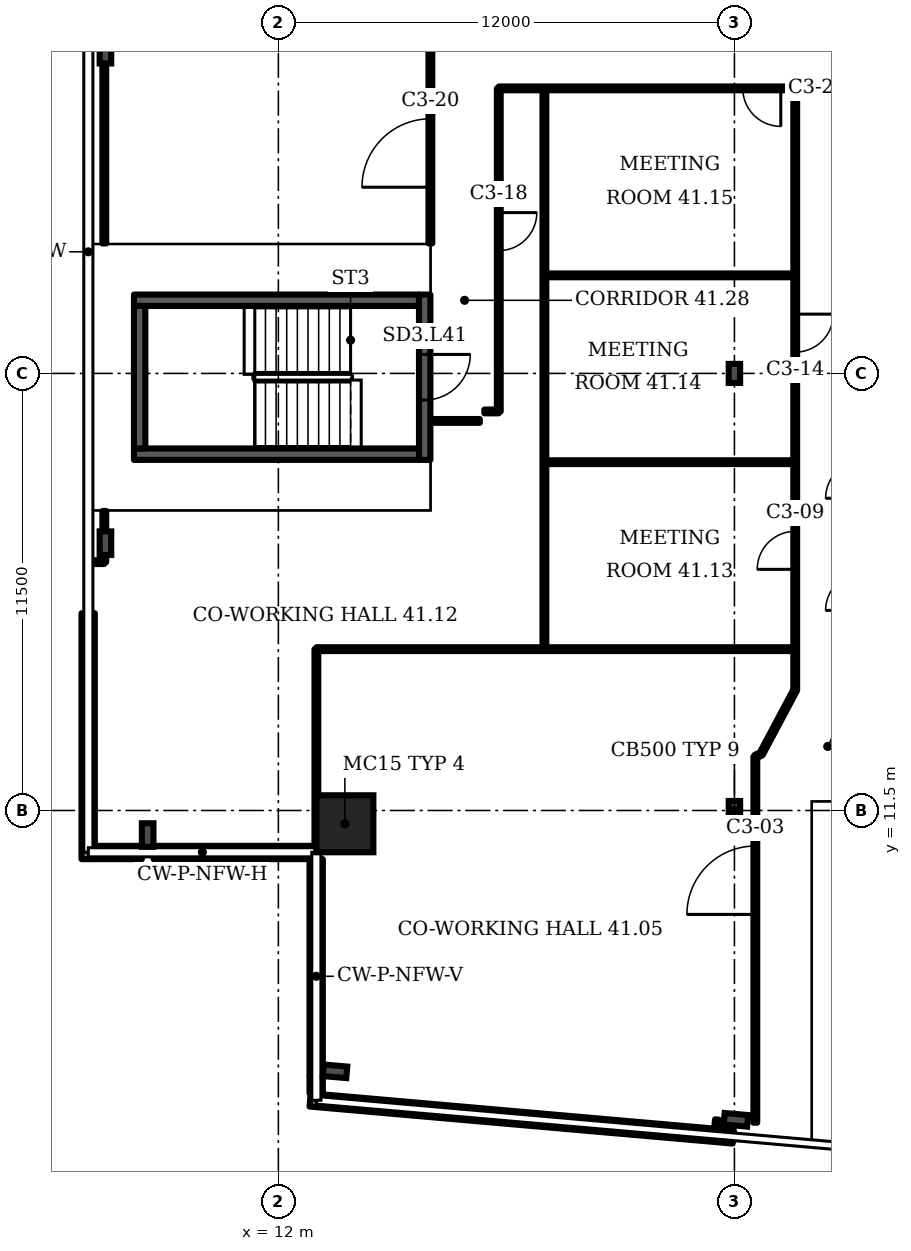
"""IFC4 building model, lengths in metres.
Left out: names, types, materials, properties, quantities, classifications, styles, units other than length and angle.
Written with IfcOpenShell. Run it as: python <this file> out.ifc"""

import sys

from ifc_helpers import new_model, si_unit, direction, frame, frame_2d, origin, origin_2d, place, context, subcontext, project, spatial, rectangle, i_section, extrude, element, fill, save


model = new_model("IFC4")
c1 = context("Model", 3, precision=1e-05, world=origin(), true_north=direction((0.0, 1.0)))
c2 = subcontext(c1, "Body", "Model", "MODEL_VIEW")
j1 = project(units=[si_unit("LENGTHUNIT", "METRE"), si_unit("PLANEANGLEUNIT", "RADIAN")], contexts=[c1])
p1 = place(None, origin())
s1 = spatial("IfcSite", under=j1, at=p1, CompositionType="ELEMENT")
p2 = place(p1, origin())
s2 = spatial("IfcBuilding", under=s1, at=p2, CompositionType="ELEMENT")
p3 = place(p2, frame((0.0, 0.0, 169.9)))
s3 = spatial("IfcBuildingStorey", under=s2, at=p3, CompositionType="ELEMENT", Elevation=169.9)
p4 = place(p3, frame((13.75, 11.15, 0.0), z_axis=(0.0, 0.0, 1.0), x_axis=(1.0, 0.0, 0.0)))
e1 = element("IfcColumn", 1, at=p4, inside=s3, PredefinedType="COLUMN", context=c2, shape_type="SweptSolid", body=[
    extrude(rectangle(XDim=1.5, YDim=1.5, at=origin_2d()), origin(), (0.0, 0.0, 1.0), 3.6),
])
for number, where, z_axis, x_axis in (
    (2, (13.491, 4.637, 0.0), (0.0, 0.0, 1.0), (-0.087, -0.996, 0.0)),
    (3, (24.039, 3.361, 0.0), (0.0, 0.0, 1.0), (-0.087, -0.996, 0.0)),
    (4, (7.45, 31.467, 0.0), (0.0, 0.0, 1.0), (-1.0, 0.0, 0.0)),
    (5, (7.45, 18.533, 0.0), (0.0, 0.0, 1.0), (-1.0, 0.0, 0.0)),
    (6, (8.561, 10.854, 0.0), (0.0, 0.0, 1.0), (-1.0, 0.0, 0.0)),
):
    element("IfcColumn", number, at=place(p3, frame(where, z_axis=z_axis, x_axis=x_axis)), inside=s3, PredefinedType="COLUMN", context=c2, shape_type="SweptSolid", body=[
        extrude(i_section(OverallWidth=0.305, OverallDepth=0.62, WebThickness=0.021, FlangeThickness=0.04, FilletRadius=0.027, at=origin_2d()), origin(), (0.0, 0.0, 1.0), 3.6),
    ])
for number, where, z_axis, x_axis in (
    (7, (24.0, 11.5, 0.0), (0.0, 0.0, 1.0), (1.0, 0.0, 0.0)),
    (8, (24.0, 23.0, 0.0), (0.0, 0.0, 1.0), (1.0, 0.0, 0.0)),
):
    element("IfcColumn", number, at=place(p3, frame(where, z_axis=z_axis, x_axis=x_axis)), inside=s3, PredefinedType="COLUMN", context=c2, shape_type="SweptSolid", body=[
        extrude(i_section(OverallWidth=0.3, OverallDepth=0.5, WebThickness=0.014, FlangeThickness=0.028, FilletRadius=0.027, at=origin_2d()), origin(), (0.0, 0.0, 1.0), 3.6),
    ])
p5 = place(p3, frame((12.835, 3.885, 0.0), z_axis=(0.0, 0.0, 1.0), x_axis=(0.996199, -0.087154, 0.0)))
e9 = element("IfcWall", 9, at=p5, inside=s3, PredefinedType="SOLIDWALL", context=c2, shape_type="SweptSolid", body=[
    extrude(rectangle(XDim=11.177, YDim=0.35, at=frame_2d((5.588, 0.0))), origin(), (0.0, 0.0, 1.0), 1.0),
])
p6 = place(p3, frame((6.995, 16.69, 0.0), z_axis=(0.0, 0.0, 1.0), x_axis=(0.0, -1.0, 0.0)))
e10 = element("IfcWall", 10, at=p6, inside=s3, PredefinedType="SOLIDWALL", context=c2, shape_type="SweptSolid", body=[
    extrude(rectangle(XDim=6.47, YDim=0.35, at=frame_2d((3.235, 0.0))), origin(), (0.0, 0.0, 1.0), 1.0),
])
p7 = place(p3, frame((7.17, 10.395, 0.0), z_axis=(0.0, 0.0, 1.0), x_axis=(1.0, 0.0, 0.0)))
e11 = element("IfcWall", 11, at=p7, inside=s3, PredefinedType="SOLIDWALL", context=c2, shape_type="SweptSolid", body=[
    extrude(rectangle(XDim=1.238, YDim=0.35, at=frame_2d((0.619, 0.0))), origin(), (0.0, 0.0, 1.0), 1.0),
])
p8 = place(p3, frame((8.713, 10.395, 0.0), z_axis=(0.0, 0.0, 1.0), x_axis=(1.0, 0.0, 0.0)))
e12 = element("IfcWall", 12, at=p8, inside=s3, PredefinedType="SOLIDWALL", context=c2, shape_type="SweptSolid", body=[
    extrude(rectangle(XDim=4.287, YDim=0.35, at=frame_2d((2.143, 0.0))), origin(), (0.0, 0.0, 1.0), 1.0),
])
p9 = place(p3, frame((12.995, 10.22, 0.0), z_axis=(0.0, 0.0, 1.0), x_axis=(0.0, -1.0, 0.0)))
e13 = element("IfcWall", 13, at=p9, inside=s3, PredefinedType="SOLIDWALL", context=c2, shape_type="SweptSolid", body=[
    extrude(rectangle(XDim=5.693, YDim=0.35, at=frame_2d((2.847, 0.0))), origin(), (0.0, 0.0, 1.0), 1.0),
])
p10 = place(p3, frame((12.995, 4.512, 0.0), z_axis=(0.0, 0.0, 1.0), x_axis=(0.0, -1.0, 0.0)))
e14 = element("IfcWall", 14, at=p10, inside=s3, PredefinedType="SOLIDWALL", context=c2, shape_type="SweptSolid", body=[
    extrude(rectangle(XDim=0.454, YDim=0.35, at=frame_2d((0.227, 0.0))), origin(), (0.0, 0.0, 1.0), 1.0),
])
p11 = place(p3, frame((15.85, 20.725, 0.0), z_axis=(0.0, 0.0, 1.0), x_axis=(0.0, 1.0, 0.0)))
e15 = element("IfcWall", 15, at=p11, inside=s3, PredefinedType="SHEAR", context=c2, shape_type="SweptSolid", body=[
    extrude(rectangle(XDim=4.35, YDim=0.3, at=frame_2d((2.175, 0.0))), origin(), (0.0, 0.0, 1.0), 3.2),
])
p12 = place(p11, frame((1.575, 0.0, 0.0)))
e16 = element("IfcOpeningElement", 16, at=p12, cuts=e15, PredefinedType="OPENING", context=c2, shape_type="SweptSolid", body=[
    extrude(rectangle(XDim=1.2, YDim=2.1, at=frame_2d((0.6, 1.05))), frame((0.0, 0.16, 0.0), z_axis=(0.0, -1.0, 0.0), x_axis=(1.0, 0.0, 0.0)), (0.0, 0.0, 1.0), 0.32),
])
p13 = place(p3, frame((7.02, 18.035, 0.0), z_axis=(0.0, 0.0, 1.0), x_axis=(1.0, 0.0, 0.0)))
e17 = element("IfcWall", 17, at=p13, inside=s3, PredefinedType="PARTITIONING", context=c2, shape_type="SweptSolid", body=[
    extrude(rectangle(XDim=0.4, YDim=0.1, at=frame_2d((0.2, 0.0))), origin(), (0.0, 0.0, 1.0), 3.2),
])
p14 = place(p3, frame((7.42, 18.035, 0.0), z_axis=(0.0, 0.0, 1.0), x_axis=(0.0, 1.0, 0.0)))
e18 = element("IfcWall", 18, at=p14, inside=s3, PredefinedType="PARTITIONING", context=c2, shape_type="SweptSolid", body=[
    extrude(rectangle(XDim=1.345, YDim=0.1, at=frame_2d((0.672, 0.0))), origin(), (0.0, 0.0, 1.0), 2.58),
])
p15 = place(p3, frame((7.42, 26.42, 0.0), z_axis=(0.0, 0.0, 1.0), x_axis=(0.0, 1.0, 0.0)))
e19 = element("IfcWall", 19, at=p15, inside=s3, PredefinedType="PARTITIONING", context=c2, shape_type="SweptSolid", body=[
    extrude(rectangle(XDim=15.56, YDim=0.1, at=frame_2d((7.78, 0.0))), origin(), (0.0, 0.0, 1.0), 2.58),
])
p16 = place(p3, frame((13.0, 10.42, 0.0), z_axis=(0.0, 0.0, 1.0), x_axis=(0.0, 1.0, 0.0)))
e20 = element("IfcWall", 20, at=p16, inside=s3, PredefinedType="PARTITIONING", context=c2, shape_type="SweptSolid", body=[
    extrude(rectangle(XDim=5.325, YDim=0.1, at=frame_2d((2.663, 0.0))), origin(), (0.0, 0.0, 1.0), 3.2),
])
p17 = place(p3, frame((13.0, 15.745, 0.0), z_axis=(0.0, 0.0, 1.0), x_axis=(1.0, 0.0, 0.0)))
e21 = element("IfcWall", 21, at=p17, inside=s3, PredefinedType="PARTITIONING", context=c2, shape_type="SweptSolid", body=[
    extrude(rectangle(XDim=12.6, YDim=0.1, at=frame_2d((6.3, 0.0))), origin(), (0.0, 0.0, 1.0), 3.2),
])
p18 = place(p3, frame((16.0, 26.42, 0.0), z_axis=(0.0, 0.0, 1.0), x_axis=(0.0, 1.0, 0.0)))
e22 = element("IfcWall", 22, at=p18, inside=s3, PredefinedType="PARTITIONING", context=c2, shape_type="SweptSolid", body=[
    extrude(rectangle(XDim=7.56, YDim=0.1, at=frame_2d((3.78, 0.0))), origin(), (0.0, 0.0, 1.0), 3.2),
])
p19 = place(p18, frame((1.48, 0.0, 0.0)))
e23 = element("IfcOpeningElement", 23, at=p19, cuts=e22, PredefinedType="OPENING", context=c2, shape_type="SweptSolid", body=[
    extrude(rectangle(XDim=1.8, YDim=2.1, at=frame_2d((0.9, 1.05))), frame((0.0, 0.06, 0.0), z_axis=(0.0, -1.0, 0.0), x_axis=(1.0, 0.0, 0.0)), (0.0, 0.0, 1.0), 0.12),
])
p20 = place(p3, frame((16.02, 21.75, 0.0), z_axis=(0.0, 0.0, 1.0), x_axis=(1.0, 0.0, 0.0)))
e24 = element("IfcWall", 24, at=p20, inside=s3, PredefinedType="PARTITIONING", context=c2, shape_type="SweptSolid", body=[
    extrude(rectangle(XDim=1.28, YDim=0.1, at=frame_2d((0.64, 0.0))), origin(), (0.0, 0.0, 1.0), 3.2),
])
p21 = place(p3, frame((17.42, 22.0, 0.0), z_axis=(0.0, 0.0, 1.0), x_axis=(1.0, 0.0, 0.0)))
e25 = element("IfcWall", 25, at=p21, inside=s3, PredefinedType="PARTITIONING", context=c2, shape_type="SweptSolid", body=[
    extrude(rectangle(XDim=0.38, YDim=0.1, at=frame_2d((0.19, 0.0))), origin(), (0.0, 0.0, 1.0), 3.2),
])
p22 = place(p3, frame((17.8, 22.0, 0.0), z_axis=(0.0, 0.0, 1.0), x_axis=(0.0, 1.0, 0.0)))
e26 = element("IfcWall", 26, at=p22, inside=s3, PredefinedType="PARTITIONING", context=c2, shape_type="SweptSolid", body=[
    extrude(rectangle(XDim=8.5, YDim=0.1, at=frame_2d((4.25, 0.0))), origin(), (0.0, 0.0, 1.0), 3.2),
])
p23 = place(p22, frame((4.231, 0.0, 0.0)))
e27 = element("IfcOpeningElement", 27, at=p23, cuts=e26, PredefinedType="OPENING", context=c2, shape_type="SweptSolid", body=[
    extrude(rectangle(XDim=1.0, YDim=2.1, at=frame_2d((0.5, 1.05))), frame((0.0, 0.06, 0.0), z_axis=(0.0, -1.0, 0.0), x_axis=(1.0, 0.0, 0.0)), (0.0, 0.0, 1.0), 0.12),
])
p24 = place(p3, frame((17.8, 30.5, 0.0), z_axis=(0.0, 0.0, 1.0), x_axis=(1.0, 0.0, 0.0)))
e28 = element("IfcWall", 28, at=p24, inside=s3, PredefinedType="PARTITIONING", context=c2, shape_type="SweptSolid", body=[
    extrude(rectangle(XDim=7.8, YDim=0.1, at=frame_2d((3.9, 0.0))), origin(), (0.0, 0.0, 1.0), 3.2),
])
p25 = place(p24, frame((6.42, 0.0, 0.0)))
e29 = element("IfcOpeningElement", 29, at=p25, cuts=e28, PredefinedType="OPENING", context=c2, shape_type="SweptSolid", body=[
    extrude(rectangle(XDim=1.0, YDim=2.1, at=frame_2d((0.5, 1.05))), frame((0.0, 0.06, 0.0), z_axis=(0.0, -1.0, 0.0), x_axis=(1.0, 0.0, 0.0)), (0.0, 0.0, 1.0), 0.12),
])
p26 = place(p3, frame((19.0, 15.745, 0.0), z_axis=(0.0, 0.0, 1.0), x_axis=(0.0, 1.0, 0.0)))
e30 = element("IfcWall", 30, at=p26, inside=s3, PredefinedType="PARTITIONING", context=c2, shape_type="SweptSolid", body=[
    extrude(rectangle(XDim=14.755, YDim=0.1, at=frame_2d((7.377, 0.0))), origin(), (0.0, 0.0, 1.0), 3.2),
])
for number, where, z_axis, x_axis in (
    (31, (19.0, 20.665, 0.0), (0.0, 0.0, 1.0), (1.0, 0.0, 0.0)),
    (32, (19.0, 25.58, 0.0), (0.0, 0.0, 1.0), (1.0, 0.0, 0.0)),
):
    element("IfcWall", number, at=place(p3, frame(where, z_axis=z_axis, x_axis=x_axis)), inside=s3, PredefinedType="PARTITIONING", context=c2, shape_type="SweptSolid", body=[
        extrude(rectangle(XDim=6.6, YDim=0.1, at=frame_2d((3.3, 0.0))), origin(), (0.0, 0.0, 1.0), 3.2),
    ])
p27 = place(p3, frame((23.502, 2.976, 0.0), z_axis=(0.0, 0.0, 1.0), x_axis=(0.095654, 0.995419, 0.0)))
e33 = element("IfcWall", 33, at=p27, inside=s3, PredefinedType="PARTITIONING", context=c2, shape_type="SweptSolid", body=[
    extrude(rectangle(XDim=0.396, YDim=0.1, at=frame_2d((0.198, 0.0))), origin(), (0.0, 0.0, 1.0), 3.2),
])
p28 = place(p3, frame((24.55, 12.915, 0.0), z_axis=(0.0, 0.0, 1.0), x_axis=(0.900306, 0.435266, 0.0)))
e34 = element("IfcWall", 34, at=p28, inside=s3, PredefinedType="PARTITIONING", context=c2, shape_type="SweptSolid", body=[
    extrude(rectangle(XDim=0.172, YDim=0.1, at=frame_2d((0.086, 0.0))), origin(), (0.0, 0.0, 1.0), 3.2),
])
p29 = place(p3, frame((24.55, 3.285, 0.0), z_axis=(0.0, 0.0, 1.0), x_axis=(0.0, 1.0, 0.0)))
e35 = element("IfcWall", 35, at=p29, inside=s3, PredefinedType="PARTITIONING", context=c2, shape_type="SweptSolid", body=[
    extrude(rectangle(XDim=9.63, YDim=0.1, at=frame_2d((4.815, 0.0))), origin(), (0.0, 0.0, 1.0), 3.2),
])
p30 = place(p29, frame((5.481, 0.0, 0.0)))
e36 = element("IfcOpeningElement", 36, at=p30, cuts=e35, PredefinedType="OPENING", context=c2, shape_type="SweptSolid", body=[
    extrude(rectangle(XDim=1.8, YDim=2.1, at=frame_2d((0.9, 1.05))), frame((0.0, 0.06, 0.0), z_axis=(0.0, -1.0, 0.0), x_axis=(1.0, 0.0, 0.0)), (0.0, 0.0, 1.0), 0.12),
])
p31 = place(p3, frame((24.705, 12.99, 0.0), z_axis=(0.0, 0.0, 1.0), x_axis=(0.4702, 0.882555, 0.0)))
e37 = element("IfcWall", 37, at=p31, inside=s3, PredefinedType="PARTITIONING", context=c2, shape_type="SweptSolid", body=[
    extrude(rectangle(XDim=1.904, YDim=0.1, at=frame_2d((0.952, 0.0))), origin(), (0.0, 0.0, 1.0), 3.2),
])
p32 = place(p3, frame((25.6, 14.67, 0.0), z_axis=(0.0, 0.0, 1.0), x_axis=(0.0, 1.0, 0.0)))
e38 = element("IfcWall", 38, at=p32, inside=s3, PredefinedType="PARTITIONING", context=c2, shape_type="SweptSolid", body=[
    extrude(rectangle(XDim=15.83, YDim=0.1, at=frame_2d((7.915, 0.0))), origin(), (0.0, 0.0, 1.0), 3.2),
])
p33 = place(p32, frame((3.175, 0.0, 0.0)))
e39 = element("IfcOpeningElement", 39, at=p33, cuts=e38, PredefinedType="OPENING", context=c2, shape_type="SweptSolid", body=[
    extrude(rectangle(XDim=1.0, YDim=2.1, at=frame_2d((0.5, 1.05))), frame((0.0, 0.06, 0.0), z_axis=(0.0, -1.0, 0.0), x_axis=(1.0, 0.0, 0.0)), (0.0, 0.0, 1.0), 0.12),
])
p34 = place(p32, frame((8.89, 0.0, 0.0)))
e40 = element("IfcOpeningElement", 40, at=p34, cuts=e38, PredefinedType="OPENING", context=c2, shape_type="SweptSolid", body=[
    extrude(rectangle(XDim=1.0, YDim=2.1, at=frame_2d((0.5, 1.05))), frame((0.0, 0.06, 0.0), z_axis=(0.0, -1.0, 0.0), x_axis=(1.0, 0.0, 0.0)), (0.0, 0.0, 1.0), 0.12),
])
for number, where, z_axis, x_axis in (
    (41, (8.2, 20.875, 0.0), (0.0, 0.0, 1.0), (1.0, 0.0, 0.0)),
    (42, (8.2, 24.925, 0.0), (0.0, 0.0, 1.0), (1.0, 0.0, 0.0)),
):
    element("IfcWall", number, at=place(p3, frame(where, z_axis=z_axis, x_axis=x_axis)), inside=s3, PredefinedType="SHEAR", context=c2, shape_type="SweptSolid", body=[
        extrude(rectangle(XDim=7.5, YDim=0.3, at=frame_2d((3.75, 0.0))), origin(), (0.0, 0.0, 1.0), 3.2),
    ])
p35 = place(p3, frame((8.35, 21.025, 0.0), z_axis=(0.0, 0.0, 1.0), x_axis=(0.0, 1.0, 0.0)))
e43 = element("IfcWall", 43, at=p35, inside=s3, PredefinedType="SHEAR", context=c2, shape_type="SweptSolid", body=[
    extrude(rectangle(XDim=3.75, YDim=0.3, at=frame_2d((1.875, 0.0))), origin(), (0.0, 0.0, 1.0), 3.2),
])
p36 = place(p12, origin())
e44 = element("IfcDoor", 44, at=p36, inside=s3, OperationType="SINGLE_SWING_RIGHT", PredefinedType="DOOR", context=c2, shape_type="SweptSolid", body=[
    extrude(rectangle(XDim=1.2, YDim=2.1, at=frame_2d((0.6, 1.05))), frame((0.0, 0.025, 0.0), z_axis=(0.0, -1.0, 0.0), x_axis=(1.0, 0.0, 0.0)), (0.0, 0.0, 1.0), 0.05),
])
fill(e16, e44)
p37 = place(p30, origin())
e45 = element("IfcDoor", 45, at=p37, inside=s3, OperationType="DOUBLE_DOOR_SINGLE_SWING", PredefinedType="DOOR", context=c2, shape_type="SweptSolid", body=[
    extrude(rectangle(XDim=1.8, YDim=2.1, at=frame_2d((0.9, 1.05))), frame((0.0, 0.025, 0.0), z_axis=(0.0, -1.0, 0.0), x_axis=(1.0, 0.0, 0.0)), (0.0, 0.0, 1.0), 0.05),
])
fill(e36, e45)
p38 = place(p33, origin())
e46 = element("IfcDoor", 46, at=p38, inside=s3, OperationType="SINGLE_SWING_LEFT", PredefinedType="DOOR", context=c2, shape_type="SweptSolid", body=[
    extrude(rectangle(XDim=1.0, YDim=2.1, at=frame_2d((0.5, 1.05))), frame((0.0, 0.025, 0.0), z_axis=(0.0, -1.0, 0.0), x_axis=(1.0, 0.0, 0.0)), (0.0, 0.0, 1.0), 0.05),
])
fill(e39, e46)
p39 = place(p34, origin())
e47 = element("IfcDoor", 47, at=p39, inside=s3, OperationType="SINGLE_SWING_RIGHT", PredefinedType="DOOR", context=c2, shape_type="SweptSolid", body=[
    extrude(rectangle(XDim=1.0, YDim=2.1, at=frame_2d((0.5, 1.05))), frame((0.0, 0.025, 0.0), z_axis=(0.0, -1.0, 0.0), x_axis=(1.0, 0.0, 0.0)), (0.0, 0.0, 1.0), 0.05),
])
fill(e40, e47)
p40 = place(p23, origin())
e48 = element("IfcDoor", 48, at=p40, inside=s3, OperationType="SINGLE_SWING_RIGHT", PredefinedType="DOOR", context=c2, shape_type="SweptSolid", body=[
    extrude(rectangle(XDim=1.0, YDim=2.1, at=frame_2d((0.5, 1.05))), frame((0.0, 0.025, 0.0), z_axis=(0.0, -1.0, 0.0), x_axis=(1.0, 0.0, 0.0)), (0.0, 0.0, 1.0), 0.05),
])
fill(e27, e48)
p41 = place(p19, origin())
e49 = element("IfcDoor", 49, at=p41, inside=s3, OperationType="DOUBLE_DOOR_SINGLE_SWING", PredefinedType="DOOR", context=c2, shape_type="SweptSolid", body=[
    extrude(rectangle(XDim=1.8, YDim=2.1, at=frame_2d((0.9, 1.05))), frame((0.0, 0.025, 0.0), z_axis=(0.0, -1.0, 0.0), x_axis=(1.0, 0.0, 0.0)), (0.0, 0.0, 1.0), 0.05),
])
fill(e23, e49)
p42 = place(p25, origin())
e50 = element("IfcDoor", 50, at=p42, inside=s3, OperationType="SINGLE_SWING_RIGHT", PredefinedType="DOOR", context=c2, shape_type="SweptSolid", body=[
    extrude(rectangle(XDim=1.0, YDim=2.1, at=frame_2d((0.5, 1.05))), frame((0.0, 0.025, 0.0), z_axis=(0.0, -1.0, 0.0), x_axis=(1.0, 0.0, 0.0)), (0.0, 0.0, 1.0), 0.05),
])
fill(e29, e50)
save(model, sys.argv[1])
